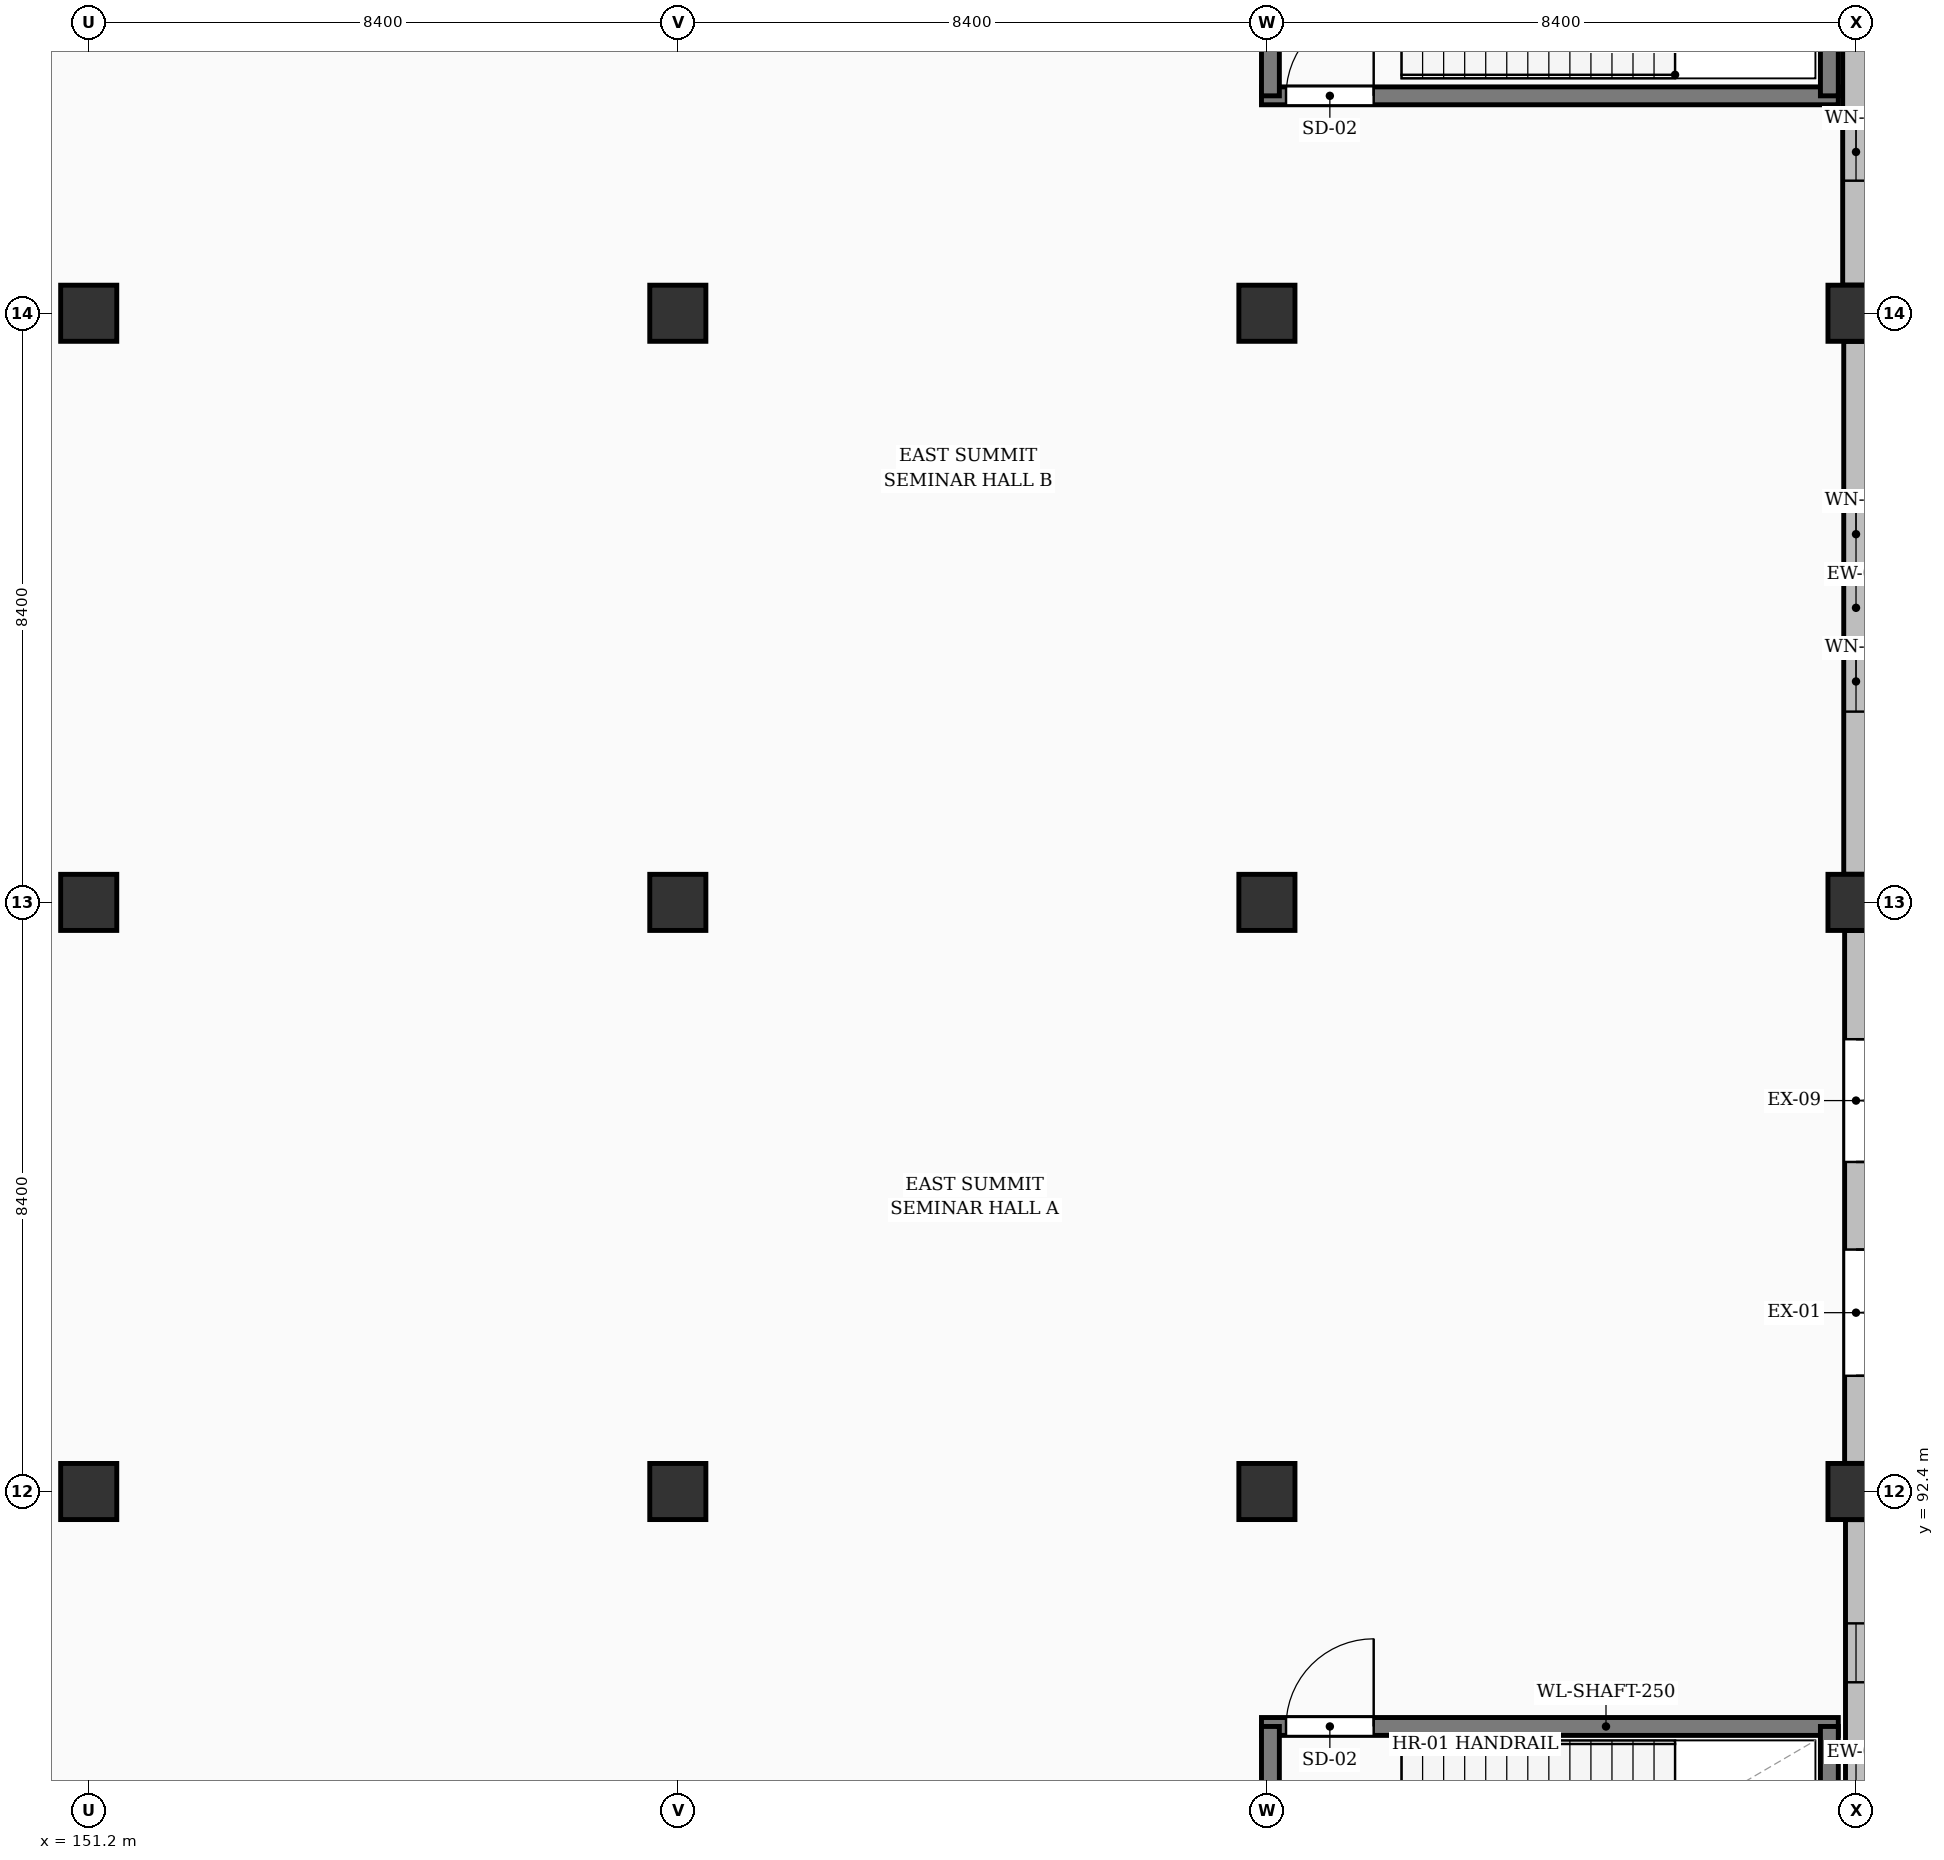
"""IFC4 building model, lengths in metres.
Left out: names, types, materials, properties, quantities, classifications, styles, units other than length and angle.
Written with IfcOpenShell. Run it as: python <this file> out.ifc"""

import sys

from ifc_helpers import new_model, si_unit, direction, frame, frame_2d, origin, origin_2d, place, context, subcontext, project, spatial, rectangle, extrude, element, fill, save


model = new_model("IFC4")
c1 = context("Model", 3, precision=1e-05, world=origin(), true_north=direction((0.0, 1.0)))
c2 = subcontext(c1, "Body", "Model", "MODEL_VIEW")
j1 = project(units=[si_unit("LENGTHUNIT", "METRE"), si_unit("PLANEANGLEUNIT", "RADIAN")], contexts=[c1])
p1 = place(None, origin())
s1 = spatial("IfcSite", under=j1, at=p1, CompositionType="ELEMENT")
p2 = place(p1, origin())
s2 = spatial("IfcBuilding", under=s1, at=p2, CompositionType="ELEMENT")
p3 = place(p2, origin())
s3 = spatial("IfcBuildingStorey", under=s2, at=p3, CompositionType="ELEMENT", Elevation=0.0)
for number, where, z_axis, x_axis in (
    (1, (151.2, 92.4, 0.0), (0.0, 0.0, 1.0), (1.0, 0.0, 0.0)),
    (2, (151.2, 100.8, 0.0), (0.0, 0.0, 1.0), (1.0, 0.0, 0.0)),
    (3, (151.2, 109.2, 0.0), (0.0, 0.0, 1.0), (1.0, 0.0, 0.0)),
    (4, (159.6, 92.4, 0.0), (0.0, 0.0, 1.0), (1.0, 0.0, 0.0)),
    (5, (159.6, 100.8, 0.0), (0.0, 0.0, 1.0), (1.0, 0.0, 0.0)),
    (6, (159.6, 109.2, 0.0), (0.0, 0.0, 1.0), (1.0, 0.0, 0.0)),
    (7, (168.0, 92.4, 0.0), (0.0, 0.0, 1.0), (1.0, 0.0, 0.0)),
    (8, (168.0, 100.8, 0.0), (0.0, 0.0, 1.0), (1.0, 0.0, 0.0)),
    (9, (168.0, 109.2, 0.0), (0.0, 0.0, 1.0), (1.0, 0.0, 0.0)),
    (10, (176.4, 92.4, 0.0), (0.0, 0.0, 1.0), (1.0, 0.0, 0.0)),
    (11, (176.4, 100.8, 0.0), (0.0, 0.0, 1.0), (1.0, 0.0, 0.0)),
    (12, (176.4, 109.2, 0.0), (0.0, 0.0, 1.0), (1.0, 0.0, 0.0)),
):
    element("IfcColumn", number, at=place(p3, frame(where, z_axis=z_axis, x_axis=x_axis)), inside=s3, PredefinedType="COLUMN", context=c2, shape_type="SweptSolid", body=[
        extrude(rectangle(XDim=0.8, YDim=0.8, at=origin_2d()), origin(), (0.0, 0.0, 1.0), 3.92),
    ])
p4 = place(p3, frame((176.4, 84.401, 0.0), z_axis=(0.0, 0.0, 1.0), x_axis=(0.0, 1.0, 0.0)))
e13 = element("IfcWall", 13, at=p4, inside=s3, PredefinedType="SOLIDWALL", context=c2, shape_type="SweptSolid", body=[
    extrude(rectangle(XDim=7.598, YDim=0.3, at=frame_2d((3.799, 0.0))), origin(), (0.0, 0.0, 1.0), 2.775),
])
p5 = place(p4, frame((2.329, 0.0, 0.3)))
e14 = element("IfcOpeningElement", 14, at=p5, cuts=e13, PredefinedType="OPENING", context=c2, shape_type="SweptSolid", body=[
    extrude(rectangle(XDim=0.84, YDim=1.95, at=frame_2d((0.42, 0.975))), frame((0.0, 0.16, 0.0), z_axis=(0.0, -1.0, 0.0), x_axis=(1.0, 0.0, 0.0)), (0.0, 0.0, 1.0), 0.32),
])
p6 = place(p4, frame((5.279, 0.0, 0.3)))
e15 = element("IfcOpeningElement", 15, at=p6, cuts=e13, PredefinedType="OPENING", context=c2, shape_type="SweptSolid", body=[
    extrude(rectangle(XDim=0.84, YDim=1.95, at=frame_2d((0.42, 0.975))), frame((0.0, 0.16, 0.0), z_axis=(0.0, -1.0, 0.0), x_axis=(1.0, 0.0, 0.0)), (0.0, 0.0, 1.0), 0.32),
])
p7 = place(p3, frame((176.4, 92.801, 0.0), z_axis=(0.0, 0.0, 1.0), x_axis=(0.0, 1.0, 0.0)))
e16 = element("IfcWall", 16, at=p7, inside=s3, PredefinedType="SOLIDWALL", context=c2, shape_type="SweptSolid", body=[
    extrude(rectangle(XDim=7.598, YDim=0.325, at=frame_2d((3.799, 0.0))), origin(), (0.0, 0.0, 1.0), 2.675),
])
p8 = place(p7, frame((1.249, 0.0, 0.0)))
e17 = element("IfcOpeningElement", 17, at=p8, cuts=e16, PredefinedType="OPENING", context=c2, shape_type="SweptSolid", body=[
    extrude(rectangle(XDim=1.8, YDim=2.2, at=frame_2d((0.9, 1.1))), frame((0.0, 0.172, 0.0), z_axis=(0.0, -1.0, 0.0), x_axis=(1.0, 0.0, 0.0)), (0.0, 0.0, 1.0), 0.345),
])
p9 = place(p7, frame((4.298, 0.0, 0.0)))
e18 = element("IfcOpeningElement", 18, at=p9, cuts=e16, PredefinedType="OPENING", context=c2, shape_type="SweptSolid", body=[
    extrude(rectangle(XDim=1.75, YDim=2.2, at=frame_2d((0.875, 1.1))), frame((0.0, 0.172, 0.0), z_axis=(0.0, -1.0, 0.0), x_axis=(1.0, 0.0, 0.0)), (0.0, 0.0, 1.0), 0.345),
])
p10 = place(p3, frame((176.4, 101.201, 0.0), z_axis=(0.0, 0.0, 1.0), x_axis=(0.0, 1.0, 0.0)))
e19 = element("IfcWall", 19, at=p10, inside=s3, PredefinedType="SOLIDWALL", context=c2, shape_type="SweptSolid", body=[
    extrude(rectangle(XDim=7.598, YDim=0.35, at=frame_2d((3.799, 0.0))), origin(), (0.0, 0.0, 1.0), 2.975),
])
p11 = place(p10, frame((2.319, 0.0, 0.3)))
e20 = element("IfcOpeningElement", 20, at=p11, cuts=e19, PredefinedType="OPENING", context=c2, shape_type="SweptSolid", body=[
    extrude(rectangle(XDim=0.86, YDim=2.05, at=frame_2d((0.43, 1.025))), frame((0.0, 0.185, 0.0), z_axis=(0.0, -1.0, 0.0), x_axis=(1.0, 0.0, 0.0)), (0.0, 0.0, 1.0), 0.37),
])
p12 = place(p10, frame((4.419, 0.0, 0.3)))
e21 = element("IfcOpeningElement", 21, at=p12, cuts=e19, PredefinedType="OPENING", context=c2, shape_type="SweptSolid", body=[
    extrude(rectangle(XDim=0.86, YDim=2.05, at=frame_2d((0.43, 1.025))), frame((0.0, 0.185, 0.0), z_axis=(0.0, -1.0, 0.0), x_axis=(1.0, 0.0, 0.0)), (0.0, 0.0, 1.0), 0.37),
])
p13 = place(p3, frame((176.4, 109.601, 0.0), z_axis=(0.0, 0.0, 1.0), x_axis=(0.0, 1.0, 0.0)))
e22 = element("IfcWall", 22, at=p13, inside=s3, PredefinedType="SOLIDWALL", context=c2, shape_type="SweptSolid", body=[
    extrude(rectangle(XDim=7.598, YDim=0.38, at=frame_2d((3.799, 0.0))), origin(), (0.0, 0.0, 1.0), 2.875),
])
p14 = place(p13, frame((1.489, 0.0, 0.3)))
e23 = element("IfcOpeningElement", 23, at=p14, cuts=e22, PredefinedType="OPENING", context=c2, shape_type="SweptSolid", body=[
    extrude(rectangle(XDim=0.82, YDim=2.15, at=frame_2d((0.41, 1.075))), frame((0.0, 0.2, 0.0), z_axis=(0.0, -1.0, 0.0), x_axis=(1.0, 0.0, 0.0)), (0.0, 0.0, 1.0), 0.4),
])
p15 = place(p13, frame((4.439, 0.0, 0.3)))
e24 = element("IfcOpeningElement", 24, at=p15, cuts=e22, PredefinedType="OPENING", context=c2, shape_type="SweptSolid", body=[
    extrude(rectangle(XDim=0.82, YDim=2.15, at=frame_2d((0.41, 1.075))), frame((0.0, 0.2, 0.0), z_axis=(0.0, -1.0, 0.0), x_axis=(1.0, 0.0, 0.0)), (0.0, 0.0, 1.0), 0.4),
])
p16 = place(p3, frame((167.923, 89.05, 0.0), z_axis=(0.0, 0.0, 1.0), x_axis=(1.0, 0.0, 0.0)))
e25 = element("IfcWall", 25, at=p16, inside=s3, PredefinedType="SOLIDWALL", context=c2, shape_type="SweptSolid", body=[
    extrude(rectangle(XDim=8.225, YDim=0.255, at=frame_2d((4.112, 0.0))), origin(), (0.0, 0.0, 1.0), 3.64),
])
p17 = place(p16, frame((0.35, 0.0, 0.0)))
e26 = element("IfcOpeningElement", 26, at=p17, cuts=e25, PredefinedType="OPENING", context=c2, shape_type="SweptSolid", body=[
    extrude(rectangle(XDim=1.25, YDim=2.2, at=frame_2d((0.625, 1.1))), frame((0.0, 0.137, 0.0), z_axis=(0.0, -1.0, 0.0), x_axis=(1.0, 0.0, 0.0)), (0.0, 0.0, 1.0), 0.275),
])
for number, where, z_axis, x_axis in (
    (27, (168.05, 85.18, 0.0), (0.0, 0.0, 1.0), (0.0, 1.0, 0.0)),
    (28, (176.02, 85.18, 0.0), (0.0, 0.0, 1.0), (0.0, 1.0, 0.0)),
):
    element("IfcWall", number, at=place(p3, frame(where, z_axis=z_axis, x_axis=x_axis)), inside=s3, PredefinedType="SOLIDWALL", context=c2, shape_type="SweptSolid", body=[
        extrude(rectangle(XDim=3.87, YDim=0.255, at=frame_2d((1.935, 0.0))), origin(), (0.0, 0.0, 1.0), 3.64),
    ])
p18 = place(p3, frame((167.923, 112.3, 0.0), z_axis=(0.0, 0.0, 1.0), x_axis=(1.0, 0.0, 0.0)))
e29 = element("IfcWall", 29, at=p18, inside=s3, PredefinedType="SOLIDWALL", context=c2, shape_type="SweptSolid", body=[
    extrude(rectangle(XDim=8.225, YDim=0.255, at=frame_2d((4.112, 0.0))), origin(), (0.0, 0.0, 1.0), 3.64),
])
p19 = place(p18, frame((0.35, 0.0, 0.0)))
e30 = element("IfcOpeningElement", 30, at=p19, cuts=e29, PredefinedType="OPENING", context=c2, shape_type="SweptSolid", body=[
    extrude(rectangle(XDim=1.25, YDim=2.2, at=frame_2d((0.625, 1.1))), frame((0.0, 0.137, 0.0), z_axis=(0.0, -1.0, 0.0), x_axis=(1.0, 0.0, 0.0)), (0.0, 0.0, 1.0), 0.275),
])
for number, where, z_axis, x_axis in (
    (31, (168.05, 112.3, 0.0), (0.0, 0.0, 1.0), (0.0, 1.0, 0.0)),
    (32, (176.02, 112.3, 0.0), (0.0, 0.0, 1.0), (0.0, 1.0, 0.0)),
):
    element("IfcWall", number, at=place(p3, frame(where, z_axis=z_axis, x_axis=x_axis)), inside=s3, PredefinedType="SOLIDWALL", context=c2, shape_type="SweptSolid", body=[
        extrude(rectangle(XDim=3.85, YDim=0.255, at=frame_2d((1.925, 0.0))), origin(), (0.0, 0.0, 1.0), 3.64),
    ])
p20 = place(p6, origin())
e33 = element("IfcWindow", 33, at=p20, inside=s3, PartitioningType="SINGLE_PANEL", PredefinedType="WINDOW", context=c2, shape_type="SweptSolid", body=[
    extrude(rectangle(XDim=0.84, YDim=1.95, at=frame_2d((0.42, 0.975))), frame((0.0, 0.03, 0.0), z_axis=(0.0, -1.0, 0.0), x_axis=(1.0, 0.0, 0.0)), (0.0, 0.0, 1.0), 0.06),
])
fill(e15, e33)
p21 = place(p8, frame((1.8, 0.0, 0.0), z_axis=(0.0, 0.0, 1.0), x_axis=(-1.0, 0.0, 0.0)))
e34 = element("IfcDoor", 34, at=p21, inside=s3, OperationType="DOUBLE_DOOR_SINGLE_SWING", PredefinedType="DOOR", context=c2, shape_type="SweptSolid", body=[
    extrude(rectangle(XDim=1.8, YDim=2.2, at=frame_2d((0.9, 1.1))), frame((0.0, 0.025, 0.0), z_axis=(0.0, -1.0, 0.0), x_axis=(1.0, 0.0, 0.0)), (0.0, 0.0, 1.0), 0.05),
])
fill(e17, e34)
p22 = place(p9, frame((1.75, 0.0, 0.0), z_axis=(0.0, 0.0, 1.0), x_axis=(-1.0, 0.0, 0.0)))
e35 = element("IfcDoor", 35, at=p22, inside=s3, OperationType="DOUBLE_DOOR_SINGLE_SWING", PredefinedType="DOOR", context=c2, shape_type="SweptSolid", body=[
    extrude(rectangle(XDim=1.75, YDim=2.2, at=frame_2d((0.875, 1.1))), frame((0.0, 0.025, 0.0), z_axis=(0.0, -1.0, 0.0), x_axis=(1.0, 0.0, 0.0)), (0.0, 0.0, 1.0), 0.05),
])
fill(e18, e35)
p23 = place(p11, origin())
e36 = element("IfcWindow", 36, at=p23, inside=s3, PartitioningType="SINGLE_PANEL", PredefinedType="WINDOW", context=c2, shape_type="SweptSolid", body=[
    extrude(rectangle(XDim=0.86, YDim=2.05, at=frame_2d((0.43, 1.025))), frame((0.0, 0.03, 0.0), z_axis=(0.0, -1.0, 0.0), x_axis=(1.0, 0.0, 0.0)), (0.0, 0.0, 1.0), 0.06),
])
fill(e20, e36)
p24 = place(p12, origin())
e37 = element("IfcWindow", 37, at=p24, inside=s3, PartitioningType="SINGLE_PANEL", PredefinedType="WINDOW", context=c2, shape_type="SweptSolid", body=[
    extrude(rectangle(XDim=0.86, YDim=2.05, at=frame_2d((0.43, 1.025))), frame((0.0, 0.03, 0.0), z_axis=(0.0, -1.0, 0.0), x_axis=(1.0, 0.0, 0.0)), (0.0, 0.0, 1.0), 0.06),
])
fill(e21, e37)
p25 = place(p14, origin())
e38 = element("IfcWindow", 38, at=p25, inside=s3, PartitioningType="SINGLE_PANEL", PredefinedType="WINDOW", context=c2, shape_type="SweptSolid", body=[
    extrude(rectangle(XDim=0.82, YDim=2.15, at=frame_2d((0.41, 1.075))), frame((0.0, 0.03, 0.0), z_axis=(0.0, -1.0, 0.0), x_axis=(1.0, 0.0, 0.0)), (0.0, 0.0, 1.0), 0.06),
])
fill(e23, e38)
p26 = place(p17, origin())
e39 = element("IfcDoor", 39, at=p26, inside=s3, OperationType="SINGLE_SWING_RIGHT", PredefinedType="DOOR", context=c2, shape_type="SweptSolid", body=[
    extrude(rectangle(XDim=1.25, YDim=2.2, at=frame_2d((0.625, 1.1))), frame((0.0, 0.025, 0.0), z_axis=(0.0, -1.0, 0.0), x_axis=(1.0, 0.0, 0.0)), (0.0, 0.0, 1.0), 0.05),
])
fill(e26, e39)
p27 = place(p19, origin())
e40 = element("IfcDoor", 40, at=p27, inside=s3, OperationType="SINGLE_SWING_RIGHT", PredefinedType="DOOR", context=c2, shape_type="SweptSolid", body=[
    extrude(rectangle(XDim=1.25, YDim=2.2, at=frame_2d((0.625, 1.1))), frame((0.0, 0.025, 0.0), z_axis=(0.0, -1.0, 0.0), x_axis=(1.0, 0.0, 0.0)), (0.0, 0.0, 1.0), 0.05),
])
fill(e30, e40)
save(model, sys.argv[1])
